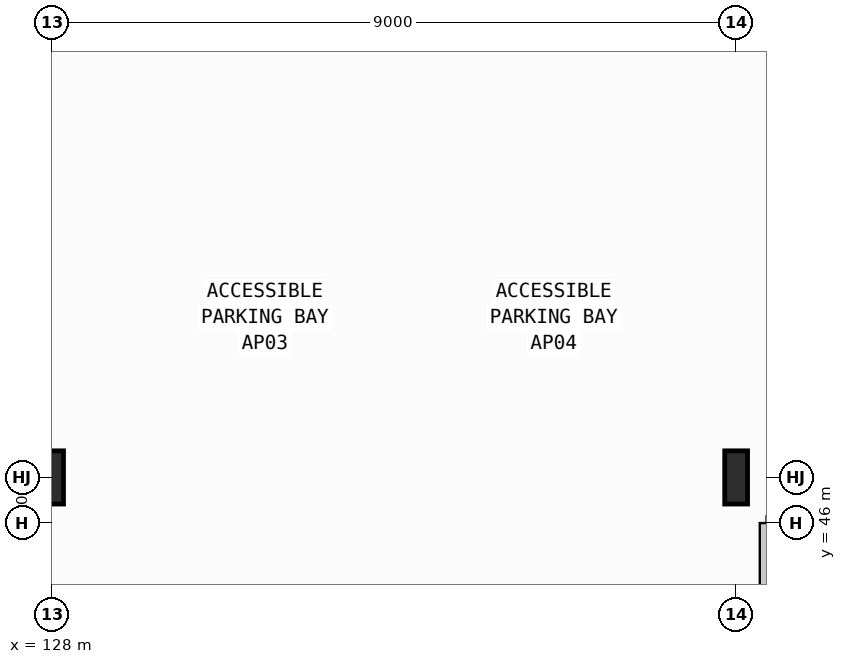
"""IFC4 building model, lengths in metres.
Left out: names, types, materials, properties, quantities, classifications, styles, units other than length and angle.
Written with IfcOpenShell. Run it as: python <this file> out.ifc"""

import sys

from ifc_helpers import new_model, si_unit, direction, frame, frame_2d, origin, origin_2d, place, context, subcontext, project, spatial, rectangle, i_section, extrude, element, save


model = new_model("IFC4")
c1 = context("Model", 3, precision=1e-05, world=origin(), true_north=direction((0.0, 1.0)))
c2 = subcontext(c1, "Body", "Model", "MODEL_VIEW")
j1 = project(units=[si_unit("LENGTHUNIT", "METRE"), si_unit("PLANEANGLEUNIT", "RADIAN")], contexts=[c1])
p1 = place(None, origin())
s1 = spatial("IfcSite", under=j1, at=p1, CompositionType="ELEMENT")
p2 = place(p1, origin())
s2 = spatial("IfcBuilding", under=s1, at=p2, CompositionType="ELEMENT")
p3 = place(p2, frame((0.0, 0.0, -5.4)))
s3 = spatial("IfcBuildingStorey", under=s2, at=p3, CompositionType="ELEMENT", Elevation=-5.4)
for number, where, z_axis, x_axis in (
    (1, (128.0, 46.6, 0.0), (0.0, 0.0, 1.0), (1.0, 0.0, 0.0)),
    (2, (137.0, 46.6, 0.0), (0.0, 0.0, 1.0), (1.0, 0.0, 0.0)),
):
    element("IfcColumn", number, at=place(p3, frame(where, z_axis=z_axis, x_axis=x_axis)), inside=s3, PredefinedType="COLUMN", context=c2, shape_type="SweptSolid", body=[
        extrude(i_section(OverallWidth=0.3, OverallDepth=0.7, WebThickness=0.017, FlangeThickness=0.032, FilletRadius=0.027, at=origin_2d()), origin(), (0.0, 0.0, 1.0), 5.4),
    ])
p4 = place(p3, frame((137.4, 38.0, 0.0), z_axis=(0.0, 0.0, 1.0), x_axis=(0.0, 1.0, 0.0)))
e3 = element("IfcWall", 3, at=p4, inside=s3, PredefinedType="PARTITIONING", context=c2, shape_type="SweptSolid", body=[
    extrude(rectangle(XDim=8.0, YDim=0.178, at=frame_2d((4.0, 0.0))), origin(), (0.0, 0.0, 1.0), 4.373),
])
save(model, sys.argv[1])
